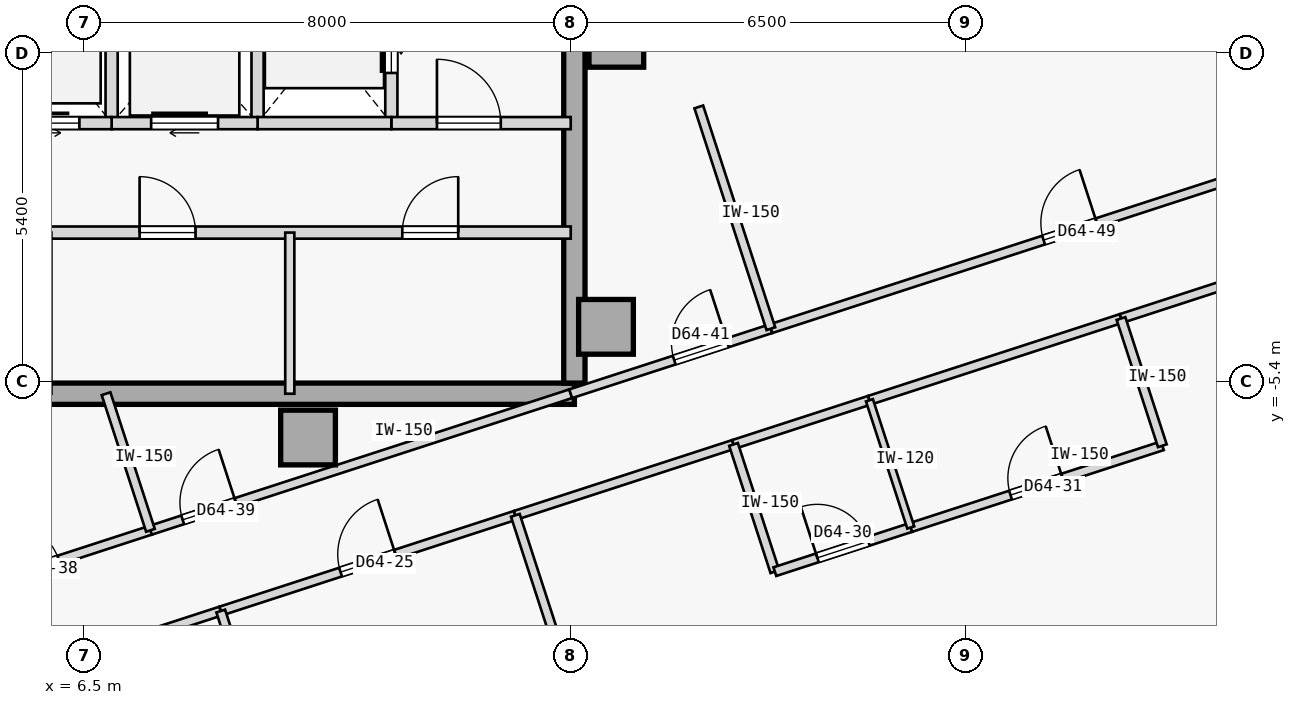
"""IFC4 building model, lengths in metres.
Left out: names, types, materials, properties, quantities, classifications, styles, units other than length and angle.
Written with IfcOpenShell. Run it as: python <this file> out.ifc"""

import sys

from ifc_helpers import new_model, si_unit, direction, frame, frame_2d, origin, origin_2d, place, context, subcontext, project, spatial, rectangle, extrude, element, fill, save


model = new_model("IFC4")
c1 = context("Model", 3, precision=1e-05, world=origin(), true_north=direction((0.0, 1.0)))
c2 = subcontext(c1, "Body", "Model", "MODEL_VIEW")
j1 = project(units=[si_unit("LENGTHUNIT", "METRE"), si_unit("PLANEANGLEUNIT", "RADIAN")], contexts=[c1])
p1 = place(None, origin())
s1 = spatial("IfcSite", under=j1, at=p1, CompositionType="ELEMENT")
p2 = place(p1, origin())
s2 = spatial("IfcBuilding", under=s1, at=p2, CompositionType="ELEMENT")
p3 = place(p2, frame((0.0, 0.0, 241.05)))
s3 = spatial("IfcBuildingStorey", under=s2, at=p3, CompositionType="ELEMENT", Elevation=241.05)
for number, where, z_axis, x_axis in (
    (1, (15.25, 0.22, 0.0), (0.0, 0.0, 1.0), (1.0, 0.0, 0.0)),
    (2, (15.08, -4.5, 0.0), (0.0, 0.0, 1.0), (1.0, 0.0, 0.0)),
    (3, (10.18, -6.32, 0.0), (0.0, 0.0, 1.0), (1.0, 0.0, 0.0)),
):
    element("IfcColumn", number, at=place(p3, frame(where, z_axis=z_axis, x_axis=x_axis)), inside=s3, PredefinedType="COLUMN", context=c2, shape_type="SweptSolid", body=[
        extrude(rectangle(XDim=0.9, YDim=0.9, at=origin_2d()), origin(), (0.0, 0.0, 1.0), 3.35),
    ])
p4 = place(p3, frame((3.7, -5.6, 0.0), z_axis=(0.0, 0.0, 1.0), x_axis=(1.0, 0.0, 0.0)))
e4 = element("IfcWall", 4, at=p4, inside=s3, PredefinedType="SHEAR", context=c2, shape_type="SweptSolid", body=[
    extrude(rectangle(XDim=10.86, YDim=0.35, at=frame_2d((5.43, 0.0))), origin(), (0.0, 0.0, 1.0), 3.125),
])
p5 = place(p3, frame((14.56, -5.425, 0.0), z_axis=(0.0, 0.0, 1.0), x_axis=(0.0, 1.0, 0.0)))
e5 = element("IfcWall", 5, at=p5, inside=s3, PredefinedType="SHEAR", context=c2, shape_type="SweptSolid", body=[
    extrude(rectangle(XDim=10.85, YDim=0.35, at=frame_2d((5.425, 0.0))), origin(), (0.0, 0.0, 1.0), 3.125),
])
p6 = place(p3, frame((11.55, -1.15, 0.0), z_axis=(0.0, 0.0, 1.0), x_axis=(0.0, 1.0, 0.0)))
e6 = element("IfcWall", 6, at=p6, inside=s3, PredefinedType="STANDARD", context=c2, shape_type="SweptSolid", body=[
    extrude(rectangle(XDim=2.75, YDim=0.2, at=frame_2d((1.375, 0.0))), origin(), (0.0, 0.0, 1.0), 3.125),
])
p7 = place(p6, frame((0.825, 0.0, 0.0)))
e7 = element("IfcOpeningElement", 7, at=p7, cuts=e6, PredefinedType="OPENING", context=c2, shape_type="SweptSolid", body=[
    extrude(rectangle(XDim=1.1, YDim=2.15, at=frame_2d((0.55, 1.075))), frame((0.0, 0.11, 0.0), z_axis=(0.0, -1.0, 0.0), x_axis=(1.0, 0.0, 0.0)), (0.0, 0.0, 1.0), 0.22),
])
p8 = place(p3, frame((9.35, -1.15, 0.0), z_axis=(0.0, 0.0, 1.0), x_axis=(0.0, 1.0, 0.0)))
e8 = element("IfcWall", 8, at=p8, inside=s3, PredefinedType="STANDARD", context=c2, shape_type="SweptSolid", body=[
    extrude(rectangle(XDim=2.75, YDim=0.2, at=frame_2d((1.375, 0.0))), origin(), (0.0, 0.0, 1.0), 3.125),
])
p9 = place(p3, frame((11.55, -1.15, 0.0), z_axis=(0.0, 0.0, 1.0), x_axis=(1.0, 0.0, 0.0)))
e9 = element("IfcWall", 9, at=p9, inside=s3, PredefinedType="STANDARD", context=c2, shape_type="SweptSolid", body=[
    extrude(rectangle(XDim=2.95, YDim=0.2, at=frame_2d((1.475, 0.0))), origin(), (0.0, 0.0, 1.0), 3.125),
])
p10 = place(p9, frame((0.75, 0.0, 0.0)))
e10 = element("IfcOpeningElement", 10, at=p10, cuts=e9, PredefinedType="OPENING", context=c2, shape_type="SweptSolid", body=[
    extrude(rectangle(XDim=1.05, YDim=2.18, at=frame_2d((0.525, 1.09))), frame((0.0, 0.11, 0.0), z_axis=(0.0, -1.0, 0.0), x_axis=(1.0, 0.0, 0.0)), (0.0, 0.0, 1.0), 0.22),
])
p11 = place(p3, frame((9.35, -1.15, 0.0), z_axis=(0.0, 0.0, 1.0), x_axis=(1.0, 0.0, 0.0)))
e11 = element("IfcWall", 11, at=p11, inside=s3, PredefinedType="STANDARD", context=c2, shape_type="SweptSolid", body=[
    extrude(rectangle(XDim=2.2, YDim=0.2, at=frame_2d((1.1, 0.0))), origin(), (0.0, 0.0, 1.0), 3.125),
])
p12 = place(p3, frame((6.95, -1.15, 0.0), z_axis=(0.0, 0.0, 1.0), x_axis=(0.0, 1.0, 0.0)))
e12 = element("IfcWall", 12, at=p12, inside=s3, PredefinedType="STANDARD", context=c2, shape_type="SweptSolid", body=[
    extrude(rectangle(XDim=2.75, YDim=0.2, at=frame_2d((1.375, 0.0))), origin(), (0.0, 0.0, 1.0), 3.125),
])
p13 = place(p3, frame((6.95, -1.15, 0.0), z_axis=(0.0, 0.0, 1.0), x_axis=(1.0, 0.0, 0.0)))
e13 = element("IfcWall", 13, at=p13, inside=s3, PredefinedType="STANDARD", context=c2, shape_type="SweptSolid", body=[
    extrude(rectangle(XDim=2.4, YDim=0.2, at=frame_2d((1.2, 0.0))), origin(), (0.0, 0.0, 1.0), 3.125),
])
p14 = place(p13, frame((0.65, 0.0, 0.0)))
e14 = element("IfcOpeningElement", 14, at=p14, cuts=e13, PredefinedType="OPENING", context=c2, shape_type="SweptSolid", body=[
    extrude(rectangle(XDim=1.1, YDim=2.15, at=frame_2d((0.55, 1.075))), frame((0.0, 0.11, 0.0), z_axis=(0.0, -1.0, 0.0), x_axis=(1.0, 0.0, 0.0)), (0.0, 0.0, 1.0), 0.22),
])
p15 = place(p3, frame((4.79, -1.15, 0.0), z_axis=(0.0, 0.0, 1.0), x_axis=(1.0, 0.0, 0.0)))
e15 = element("IfcWall", 15, at=p15, inside=s3, PredefinedType="STANDARD", context=c2, shape_type="SweptSolid", body=[
    extrude(rectangle(XDim=2.16, YDim=0.2, at=frame_2d((1.08, 0.0))), origin(), (0.0, 0.0, 1.0), 3.125),
])
p16 = place(p15, frame((0.53, 0.0, 0.0)))
e16 = element("IfcOpeningElement", 16, at=p16, cuts=e15, PredefinedType="OPENING", context=c2, shape_type="SweptSolid", body=[
    extrude(rectangle(XDim=1.1, YDim=2.15, at=frame_2d((0.55, 1.075))), frame((0.0, 0.11, 0.0), z_axis=(0.0, -1.0, 0.0), x_axis=(1.0, 0.0, 0.0)), (0.0, 0.0, 1.0), 0.22),
])
p17 = place(p3, frame((3.7, -2.95, 0.0), z_axis=(0.0, 0.0, 1.0), x_axis=(1.0, 0.0, 0.0)))
e17 = element("IfcWall", 17, at=p17, inside=s3, PredefinedType="STANDARD", context=c2, shape_type="SweptSolid", body=[
    extrude(rectangle(XDim=10.8, YDim=0.2, at=frame_2d((5.4, 0.0))), origin(), (0.0, 0.0, 1.0), 3.125),
])
p18 = place(p17, frame((0.53, 0.0, 0.0)))
e18 = element("IfcOpeningElement", 18, at=p18, cuts=e17, PredefinedType="OPENING", context=c2, shape_type="SweptSolid", body=[
    extrude(rectangle(XDim=1.1, YDim=2.15, at=frame_2d((0.55, 1.075))), frame((0.0, 0.11, 0.0), z_axis=(0.0, -1.0, 0.0), x_axis=(1.0, 0.0, 0.0)), (0.0, 0.0, 1.0), 0.22),
])
p19 = place(p17, frame((3.71, 0.0, 0.0)))
e19 = element("IfcOpeningElement", 19, at=p19, cuts=e17, PredefinedType="OPENING", context=c2, shape_type="SweptSolid", body=[
    extrude(rectangle(XDim=0.92, YDim=2.15, at=frame_2d((0.46, 1.075))), frame((0.0, 0.11, 0.0), z_axis=(0.0, -1.0, 0.0), x_axis=(1.0, 0.0, 0.0)), (0.0, 0.0, 1.0), 0.22),
])
p20 = place(p17, frame((8.03, 0.0, 0.0)))
e20 = element("IfcOpeningElement", 20, at=p20, cuts=e17, PredefinedType="OPENING", context=c2, shape_type="SweptSolid", body=[
    extrude(rectangle(XDim=0.92, YDim=2.15, at=frame_2d((0.46, 1.075))), frame((0.0, 0.11, 0.0), z_axis=(0.0, -1.0, 0.0), x_axis=(1.0, 0.0, 0.0)), (0.0, 0.0, 1.0), 0.22),
])
p21 = place(p3, frame((9.88, -5.6, 0.0), z_axis=(0.0, 0.0, 1.0), x_axis=(0.0, 1.0, 0.0)))
e21 = element("IfcWall", 21, at=p21, inside=s3, PredefinedType="PARTITIONING", context=c2, shape_type="SweptSolid", body=[
    extrude(rectangle(XDim=2.65, YDim=0.15, at=frame_2d((1.325, 0.0))), origin(), (0.0, 0.0, 1.0), 3.125),
])
p22 = place(p3, frame((8.744, -9.174, 0.0), z_axis=(0.0, 0.0, 1.0), x_axis=(0.95105238152, 0.309029719615, 0.0)))
e22 = element("IfcWall", 22, at=p22, inside=s3, PredefinedType="PARTITIONING", context=c2, shape_type="SweptSolid", body=[
    extrude(rectangle(XDim=5.094, YDim=0.15, at=frame_2d((2.547, 0.0))), origin(), (0.0, 0.0, 1.0), 3.125),
])
p23 = place(p22, frame((2.072, 0.0, 0.0)))
e23 = element("IfcOpeningElement", 23, at=p23, cuts=e22, PredefinedType="OPENING", context=c2, shape_type="SweptSolid", body=[
    extrude(rectangle(XDim=0.95, YDim=2.15, at=frame_2d((0.475, 1.075))), frame((0.0, 0.085, 0.0), z_axis=(0.0, -1.0, 0.0), x_axis=(1.0, 0.0, 0.0)), (0.0, 0.0, 1.0), 0.17),
])
p24 = place(p3, frame((4.607, -10.518, 0.0), z_axis=(0.0, 0.0, 1.0), x_axis=(0.951052627573, 0.309028962374, 0.0)))
e24 = element("IfcWall", 24, at=p24, inside=s3, PredefinedType="PARTITIONING", context=c2, shape_type="SweptSolid", body=[
    extrude(rectangle(XDim=4.35, YDim=0.15, at=frame_2d((2.175, 0.0))), origin(), (0.0, 0.0, 1.0), 3.125),
])
p25 = place(p3, frame((13.589, -7.6, 0.0), z_axis=(0.0, 0.0, 1.0), x_axis=(0.95105023481, 0.30903632613, 0.0)))
e25 = element("IfcWall", 25, at=p25, inside=s3, PredefinedType="PARTITIONING", context=c2, shape_type="SweptSolid", body=[
    extrude(rectangle(XDim=3.773, YDim=0.15, at=frame_2d((1.886, 0.0))), origin(), (0.0, 0.0, 1.0), 3.125),
])
p26 = place(p3, frame((23.549, -4.363, 0.0), z_axis=(0.0, 0.0, 1.0), x_axis=(0.951054649174, 0.309022740723, 0.0)))
e26 = element("IfcWall", 26, at=p26, inside=s3, PredefinedType="PARTITIONING", context=c2, shape_type="SweptSolid", body=[
    extrude(rectangle(XDim=6.799, YDim=0.15, at=frame_2d((3.399, 0.0))), origin(), (0.0, 0.0, 1.0), 3.125),
])
p27 = place(p26, frame((2.925, 0.0, 0.0)))
e27 = element("IfcOpeningElement", 27, at=p27, cuts=e26, PredefinedType="OPENING", context=c2, shape_type="SweptSolid", body=[
    extrude(rectangle(XDim=0.95, YDim=2.15, at=frame_2d((0.475, 1.075))), frame((0.0, 0.085, 0.0), z_axis=(0.0, -1.0, 0.0), x_axis=(1.0, 0.0, 0.0)), (0.0, 0.0, 1.0), 0.17),
])
p28 = place(p3, frame((17.177, -6.434, 0.0), z_axis=(0.0, 0.0, 1.0), x_axis=(0.951066131077, 0.308987401554, 0.0)))
e28 = element("IfcWall", 28, at=p28, inside=s3, PredefinedType="PARTITIONING", context=c2, shape_type="SweptSolid", body=[
    extrude(rectangle(XDim=2.35, YDim=0.15, at=frame_2d((1.175, 0.0))), origin(), (0.0, 0.0, 1.0), 3.125),
])
p29 = place(p3, frame((19.412, -5.708, 0.0), z_axis=(0.0, 0.0, 1.0), x_axis=(0.951057987102, 0.309012467661, 0.0)))
e29 = element("IfcWall", 29, at=p29, inside=s3, PredefinedType="PARTITIONING", context=c2, shape_type="SweptSolid", body=[
    extrude(rectangle(XDim=4.35, YDim=0.15, at=frame_2d((2.175, 0.0))), origin(), (0.0, 0.0, 1.0), 3.125),
])
p30 = place(p3, frame((3.7, -9.109, 0.0), z_axis=(0.0, 0.0, 1.0), x_axis=(0.95106259184, 0.308998295145, 0.0)))
e30 = element("IfcWall", 30, at=p30, inside=s3, PredefinedType="PARTITIONING", context=c2, shape_type="SweptSolid", body=[
    extrude(rectangle(XDim=4.088, YDim=0.15, at=frame_2d((2.044, 0.0))), origin(), (0.0, 0.0, 1.0), 3.125),
])
p31 = place(p30, frame((1.584, 0.0, 0.0)))
e31 = element("IfcOpeningElement", 31, at=p31, cuts=e30, PredefinedType="OPENING", context=c2, shape_type="SweptSolid", body=[
    extrude(rectangle(XDim=0.92, YDim=2.15, at=frame_2d((0.46, 1.075))), frame((0.0, 0.085, 0.0), z_axis=(0.0, -1.0, 0.0), x_axis=(1.0, 0.0, 0.0)), (0.0, 0.0, 1.0), 0.17),
])
p32 = place(p3, frame((7.588, -7.846, 0.0), z_axis=(0.0, 0.0, 1.0), x_axis=(0.951058013903, 0.309012385174, 0.0)))
e32 = element("IfcWall", 32, at=p32, inside=s3, PredefinedType="PARTITIONING", context=c2, shape_type="SweptSolid", body=[
    extrude(rectangle(XDim=7.267, YDim=0.15, at=frame_2d((3.634, 0.0))), origin(), (0.0, 0.0, 1.0), 3.125),
])
p33 = place(p32, frame((0.557, 0.0, 0.0)))
e33 = element("IfcOpeningElement", 33, at=p33, cuts=e32, PredefinedType="OPENING", context=c2, shape_type="SweptSolid", body=[
    extrude(rectangle(XDim=0.92, YDim=2.15, at=frame_2d((0.46, 1.075))), frame((0.0, 0.085, 0.0), z_axis=(0.0, -1.0, 0.0), x_axis=(1.0, 0.0, 0.0)), (0.0, 0.0, 1.0), 0.17),
])
p34 = place(p3, frame((14.5, -5.6, 0.0), z_axis=(0.0, 0.0, 1.0), x_axis=(0.951047546178, 0.309044600193, 0.0)))
e34 = element("IfcWall", 34, at=p34, inside=s3, PredefinedType="PARTITIONING", context=c2, shape_type="SweptSolid", body=[
    extrude(rectangle(XDim=3.461, YDim=0.15, at=frame_2d((1.73, 0.0))), origin(), (0.0, 0.0, 1.0), 3.125),
])
p35 = place(p34, frame((1.79, 0.0, 0.0)))
e35 = element("IfcOpeningElement", 35, at=p35, cuts=e34, PredefinedType="OPENING", context=c2, shape_type="SweptSolid", body=[
    extrude(rectangle(XDim=0.92, YDim=2.15, at=frame_2d((0.46, 1.075))), frame((0.0, 0.085, 0.0), z_axis=(0.0, -1.0, 0.0), x_axis=(1.0, 0.0, 0.0)), (0.0, 0.0, 1.0), 0.17),
])
p36 = place(p3, frame((17.791, -4.531, 0.0), z_axis=(0.0, 0.0, 1.0), x_axis=(0.951056769902, 0.309016213852, 0.0)))
e36 = element("IfcWall", 36, at=p36, inside=s3, PredefinedType="PARTITIONING", context=c2, shape_type="SweptSolid", body=[
    extrude(rectangle(XDim=10.352, YDim=0.15, at=frame_2d((5.176, 0.0))), origin(), (0.0, 0.0, 1.0), 3.125),
])
p37 = place(p36, frame((4.716, 0.0, 0.0)))
e37 = element("IfcOpeningElement", 37, at=p37, cuts=e36, PredefinedType="OPENING", context=c2, shape_type="SweptSolid", body=[
    extrude(rectangle(XDim=0.92, YDim=2.15, at=frame_2d((0.46, 1.075))), frame((0.0, 0.085, 0.0), z_axis=(0.0, -1.0, 0.0), x_axis=(1.0, 0.0, 0.0)), (0.0, 0.0, 1.0), 0.17),
])
p38 = place(p3, frame((27.637, -1.332, 0.0), z_axis=(0.0, 0.0, 1.0), x_axis=(-0.309040411618, 0.951048907253, 0.0)))
e38 = element("IfcWall", 38, at=p38, inside=s3, PredefinedType="PARTITIONING", context=c2, shape_type="SweptSolid", body=[
    extrude(rectangle(XDim=8.826, YDim=0.15, at=frame_2d((4.413, 0.0))), origin(), (0.0, 0.0, 1.0), 3.125),
])
p39 = place(p3, frame((9.424, -11.266, 0.0), z_axis=(0.0, 0.0, 1.0), x_axis=(-0.309060979314, 0.951042223598, 0.0)))
e39 = element("IfcWall", 39, at=p39, inside=s3, PredefinedType="PARTITIONING", context=c2, shape_type="SweptSolid", body=[
    extrude(rectangle(XDim=2.2, YDim=0.15, at=frame_2d((1.1, 0.0))), origin(), (0.0, 0.0, 1.0), 3.125),
])
p40 = place(p3, frame((16.636, -16.979, 0.0), z_axis=(0.0, 0.0, 1.0), x_axis=(-0.309022258842, 0.95105480575, 0.0)))
e40 = element("IfcWall", 40, at=p40, inside=s3, PredefinedType="PARTITIONING", context=c2, shape_type="SweptSolid", body=[
    extrude(rectangle(XDim=9.862, YDim=0.15, at=frame_2d((4.931, 0.0))), origin(), (0.0, 0.0, 1.0), 2.675),
])
p41 = place(p3, frame((17.857, -8.526, 0.0), z_axis=(0.0, 0.0, 1.0), x_axis=(-0.309060979314, 0.951042223598, 0.0)))
e41 = element("IfcWall", 41, at=p41, inside=s3, PredefinedType="PARTITIONING", context=c2, shape_type="SweptSolid", body=[
    extrude(rectangle(XDim=2.2, YDim=0.15, at=frame_2d((1.1, 0.0))), origin(), (0.0, 0.0, 1.0), 3.125),
])
p42 = place(p3, frame((17.857, -8.526, 0.0), z_axis=(0.0, 0.0, 1.0), x_axis=(0.951066131077, 0.308987401554, 0.0)))
e42 = element("IfcWall", 42, at=p42, inside=s3, PredefinedType="PARTITIONING", context=c2, shape_type="SweptSolid", body=[
    extrude(rectangle(XDim=2.35, YDim=0.15, at=frame_2d((1.175, 0.0))), origin(), (0.0, 0.0, 1.0), 3.125),
])
p43 = place(p42, frame((0.735, 0.0, 0.0)))
e43 = element("IfcOpeningElement", 43, at=p43, cuts=e42, PredefinedType="OPENING", context=c2, shape_type="SweptSolid", body=[
    extrude(rectangle(XDim=0.88, YDim=2.15, at=frame_2d((0.44, 1.075))), frame((0.0, 0.085, 0.0), z_axis=(0.0, -1.0, 0.0), x_axis=(1.0, 0.0, 0.0)), (0.0, 0.0, 1.0), 0.17),
])
p44 = place(p3, frame((20.092, -7.8, 0.0), z_axis=(0.0, 0.0, 1.0), x_axis=(0.951057987102, 0.309012467661, 0.0)))
e44 = element("IfcWall", 44, at=p44, inside=s3, PredefinedType="PARTITIONING", context=c2, shape_type="SweptSolid", body=[
    extrude(rectangle(XDim=4.35, YDim=0.15, at=frame_2d((2.175, 0.0))), origin(), (0.0, 0.0, 1.0), 3.125),
])
p45 = place(p44, frame((1.725, 0.0, 0.0)))
e45 = element("IfcOpeningElement", 45, at=p45, cuts=e44, PredefinedType="OPENING", context=c2, shape_type="SweptSolid", body=[
    extrude(rectangle(XDim=0.9, YDim=2.15, at=frame_2d((0.45, 1.075))), frame((0.0, 0.085, 0.0), z_axis=(0.0, -1.0, 0.0), x_axis=(1.0, 0.0, 0.0)), (0.0, 0.0, 1.0), 0.17),
])
p46 = place(p3, frame((24.229, -6.456, 0.0), z_axis=(0.0, 0.0, 1.0), x_axis=(-0.309060979314, 0.951042223598, 0.0)))
e46 = element("IfcWall", 46, at=p46, inside=s3, PredefinedType="PARTITIONING", context=c2, shape_type="SweptSolid", body=[
    extrude(rectangle(XDim=2.2, YDim=0.15, at=frame_2d((1.1, 0.0))), origin(), (0.0, 0.0, 1.0), 3.125),
])
p47 = place(p3, frame((20.092, -7.8, 0.0), z_axis=(0.0, 0.0, 1.0), x_axis=(-0.309060979314, 0.951042223598, 0.0)))
e47 = element("IfcWall", 47, at=p47, inside=s3, PredefinedType="PARTITIONING", context=c2, shape_type="SweptSolid", body=[
    extrude(rectangle(XDim=2.2, YDim=0.12, at=frame_2d((1.1, 0.0))), origin(), (0.0, 0.0, 1.0), 3.125),
])
p48 = place(p3, frame((7.588, -7.846, 0.0), z_axis=(0.0, 0.0, 1.0), x_axis=(-0.309055688452, 0.951043942957, 0.0)))
e48 = element("IfcWall", 48, at=p48, inside=s3, PredefinedType="PARTITIONING", context=c2, shape_type="SweptSolid", body=[
    extrude(rectangle(XDim=2.362, YDim=0.15, at=frame_2d((1.181, 0.0))), origin(), (0.0, 0.0, 1.0), 3.125),
])
p49 = place(p3, frame((17.791, -4.531, 0.0), z_axis=(0.0, 0.0, 1.0), x_axis=(-0.309018414265, 0.951056054944, 0.0)))
e49 = element("IfcWall", 49, at=p49, inside=s3, PredefinedType="PARTITIONING", context=c2, shape_type="SweptSolid", body=[
    extrude(rectangle(XDim=3.835, YDim=0.15, at=frame_2d((1.917, 0.0))), origin(), (0.0, 0.0, 1.0), 3.125),
])
p50 = place(p10, origin())
e50 = element("IfcDoor", 50, at=p50, inside=s3, OperationType="SINGLE_SWING_LEFT", PredefinedType="DOOR", context=c2, shape_type="SweptSolid", body=[
    extrude(rectangle(XDim=1.05, YDim=2.18, at=frame_2d((0.525, 1.09))), frame((0.0, 0.025, 0.0), z_axis=(0.0, -1.0, 0.0), x_axis=(1.0, 0.0, 0.0)), (0.0, 0.0, 1.0), 0.05),
])
fill(e10, e50)
p51 = place(p7, origin())
e51 = element("IfcDoor", 51, at=p51, inside=s3, OperationType="SLIDING_TO_RIGHT", PredefinedType="DOOR", context=c2, shape_type="SweptSolid", body=[
    extrude(rectangle(XDim=1.1, YDim=2.15, at=frame_2d((0.55, 1.075))), frame((0.0, 0.025, 0.0), z_axis=(0.0, -1.0, 0.0), x_axis=(1.0, 0.0, 0.0)), (0.0, 0.0, 1.0), 0.05),
])
fill(e7, e51)
p52 = place(p14, origin())
e52 = element("IfcDoor", 52, at=p52, inside=s3, OperationType="SLIDING_TO_RIGHT", PredefinedType="DOOR", context=c2, shape_type="SweptSolid", body=[
    extrude(rectangle(XDim=1.1, YDim=2.15, at=frame_2d((0.55, 1.075))), frame((0.0, 0.025, 0.0), z_axis=(0.0, -1.0, 0.0), x_axis=(1.0, 0.0, 0.0)), (0.0, 0.0, 1.0), 0.05),
])
fill(e14, e52)
p53 = place(p16, origin())
e53 = element("IfcDoor", 53, at=p53, inside=s3, OperationType="SLIDING_TO_LEFT", PredefinedType="DOOR", context=c2, shape_type="SweptSolid", body=[
    extrude(rectangle(XDim=1.1, YDim=2.15, at=frame_2d((0.55, 1.075))), frame((0.0, 0.025, 0.0), z_axis=(0.0, -1.0, 0.0), x_axis=(1.0, 0.0, 0.0)), (0.0, 0.0, 1.0), 0.05),
])
fill(e16, e53)
p54 = place(p19, origin())
e54 = element("IfcDoor", 54, at=p54, inside=s3, OperationType="SINGLE_SWING_LEFT", PredefinedType="DOOR", context=c2, shape_type="SweptSolid", body=[
    extrude(rectangle(XDim=0.92, YDim=2.15, at=frame_2d((0.46, 1.075))), frame((0.0, 0.025, 0.0), z_axis=(0.0, -1.0, 0.0), x_axis=(1.0, 0.0, 0.0)), (0.0, 0.0, 1.0), 0.05),
])
fill(e19, e54)
p55 = place(p20, origin())
e55 = element("IfcDoor", 55, at=p55, inside=s3, OperationType="SINGLE_SWING_RIGHT", PredefinedType="DOOR", context=c2, shape_type="SweptSolid", body=[
    extrude(rectangle(XDim=0.92, YDim=2.15, at=frame_2d((0.46, 1.075))), frame((0.0, 0.025, 0.0), z_axis=(0.0, -1.0, 0.0), x_axis=(1.0, 0.0, 0.0)), (0.0, 0.0, 1.0), 0.05),
])
fill(e20, e55)
p56 = place(p23, origin())
e56 = element("IfcDoor", 56, at=p56, inside=s3, OperationType="SINGLE_SWING_RIGHT", PredefinedType="DOOR", context=c2, shape_type="SweptSolid", body=[
    extrude(rectangle(XDim=0.95, YDim=2.15, at=frame_2d((0.475, 1.075))), frame((0.0, 0.025, 0.0), z_axis=(0.0, -1.0, 0.0), x_axis=(1.0, 0.0, 0.0)), (0.0, 0.0, 1.0), 0.05),
])
fill(e23, e56)
p57 = place(p43, origin())
e57 = element("IfcDoor", 57, at=p57, inside=s3, OperationType="SINGLE_SWING_LEFT", PredefinedType="DOOR", context=c2, shape_type="SweptSolid", body=[
    extrude(rectangle(XDim=0.88, YDim=2.15, at=frame_2d((0.44, 1.075))), frame((0.0, 0.025, 0.0), z_axis=(0.0, -1.0, 0.0), x_axis=(1.0, 0.0, 0.0)), (0.0, 0.0, 1.0), 0.05),
])
fill(e43, e57)
p58 = place(p45, origin())
e58 = element("IfcDoor", 58, at=p58, inside=s3, OperationType="SINGLE_SWING_RIGHT", PredefinedType="DOOR", context=c2, shape_type="SweptSolid", body=[
    extrude(rectangle(XDim=0.9, YDim=2.15, at=frame_2d((0.45, 1.075))), frame((0.0, 0.025, 0.0), z_axis=(0.0, -1.0, 0.0), x_axis=(1.0, 0.0, 0.0)), (0.0, 0.0, 1.0), 0.05),
])
fill(e45, e58)
p59 = place(p31, origin())
e59 = element("IfcDoor", 59, at=p59, inside=s3, OperationType="SINGLE_SWING_LEFT", PredefinedType="DOOR", context=c2, shape_type="SweptSolid", body=[
    extrude(rectangle(XDim=0.92, YDim=2.15, at=frame_2d((0.46, 1.075))), frame((0.0, 0.025, 0.0), z_axis=(0.0, -1.0, 0.0), x_axis=(1.0, 0.0, 0.0)), (0.0, 0.0, 1.0), 0.05),
])
fill(e31, e59)
p60 = place(p33, origin())
e60 = element("IfcDoor", 60, at=p60, inside=s3, OperationType="SINGLE_SWING_RIGHT", PredefinedType="DOOR", context=c2, shape_type="SweptSolid", body=[
    extrude(rectangle(XDim=0.92, YDim=2.15, at=frame_2d((0.46, 1.075))), frame((0.0, 0.025, 0.0), z_axis=(0.0, -1.0, 0.0), x_axis=(1.0, 0.0, 0.0)), (0.0, 0.0, 1.0), 0.05),
])
fill(e33, e60)
p61 = place(p35, origin())
e61 = element("IfcDoor", 61, at=p61, inside=s3, OperationType="SINGLE_SWING_RIGHT", PredefinedType="DOOR", context=c2, shape_type="SweptSolid", body=[
    extrude(rectangle(XDim=0.92, YDim=2.15, at=frame_2d((0.46, 1.075))), frame((0.0, 0.025, 0.0), z_axis=(0.0, -1.0, 0.0), x_axis=(1.0, 0.0, 0.0)), (0.0, 0.0, 1.0), 0.05),
])
fill(e35, e61)
p62 = place(p37, origin())
e62 = element("IfcDoor", 62, at=p62, inside=s3, OperationType="SINGLE_SWING_RIGHT", PredefinedType="DOOR", context=c2, shape_type="SweptSolid", body=[
    extrude(rectangle(XDim=0.92, YDim=2.15, at=frame_2d((0.46, 1.075))), frame((0.0, 0.025, 0.0), z_axis=(0.0, -1.0, 0.0), x_axis=(1.0, 0.0, 0.0)), (0.0, 0.0, 1.0), 0.05),
])
fill(e37, e62)
save(model, sys.argv[1])
